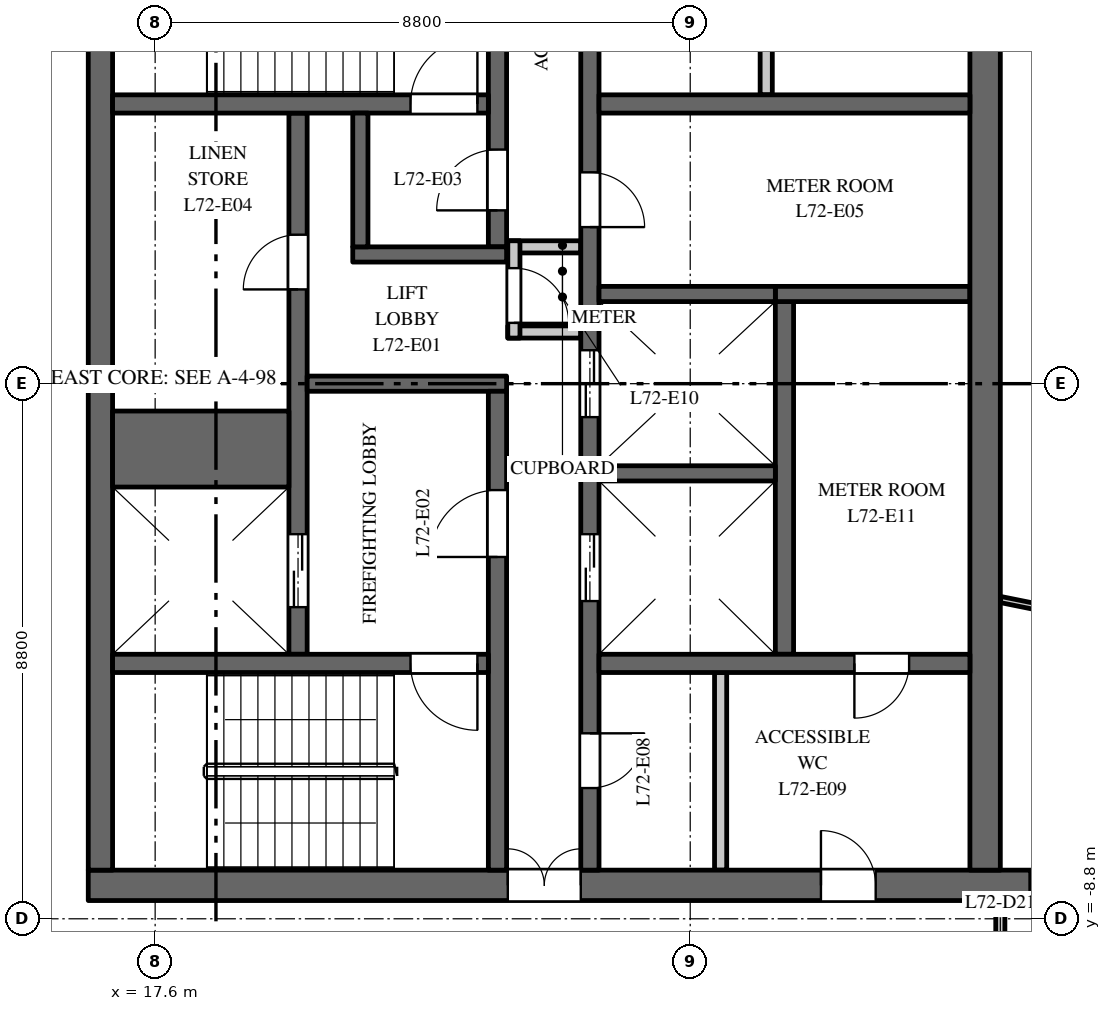
"""IFC4 building model, lengths in metres.
Left out: names, types, materials, properties, quantities, classifications, styles, units other than length and angle.
Written with IfcOpenShell. Run it as: python <this file> out.ifc"""

import sys

from ifc_helpers import new_model, si_unit, direction, frame, frame_2d, origin, place, context, subcontext, project, spatial, rectangle, extrude, element, fill, save


model = new_model("IFC4")
c1 = context("Model", 3, precision=1e-05, world=origin(), true_north=direction((0.0, 1.0)))
c2 = subcontext(c1, "Body", "Model", "MODEL_VIEW")
j1 = project(units=[si_unit("LENGTHUNIT", "METRE"), si_unit("PLANEANGLEUNIT", "RADIAN")], contexts=[c1])
p1 = place(None, origin())
s1 = spatial("IfcSite", under=j1, at=p1, CompositionType="ELEMENT")
p2 = place(p1, origin())
s2 = spatial("IfcBuilding", under=s1, at=p2, CompositionType="ELEMENT")
p3 = place(p2, frame((0.0, 0.0, 331.0)))
s3 = spatial("IfcBuildingStorey", under=s2, at=p3, CompositionType="ELEMENT", Elevation=331.0)
p4 = place(p3, frame((16.5, -8.25, 0.0), z_axis=(0.0, 0.0, 1.0), x_axis=(1.0, 0.0, 0.0)))
e1 = element("IfcWall", 1, at=p4, inside=s3, PredefinedType="SHEAR", context=c2, shape_type="SweptSolid", body=[
    extrude(rectangle(XDim=15.5, YDim=0.5, at=frame_2d((7.75, 0.0))), origin(), (0.0, 0.0, 1.0), 3.7),
])
p5 = place(p4, frame((6.9, 0.0, 0.0)))
e2 = element("IfcOpeningElement", 2, at=p5, cuts=e1, PredefinedType="OPENING", context=c2, shape_type="SweptSolid", body=[
    extrude(rectangle(XDim=1.2, YDim=2.1, at=frame_2d((0.6, 1.05))), frame((0.0, 0.26, 0.0), z_axis=(0.0, -1.0, 0.0), x_axis=(1.0, 0.0, 0.0)), (0.0, 0.0, 1.0), 0.52),
])
p6 = place(p4, frame((12.05, 0.0, 0.0)))
e3 = element("IfcOpeningElement", 3, at=p6, cuts=e1, PredefinedType="OPENING", context=c2, shape_type="SweptSolid", body=[
    extrude(rectangle(XDim=0.9, YDim=2.1, at=frame_2d((0.45, 1.05))), frame((0.0, 0.26, 0.0), z_axis=(0.0, -1.0, 0.0), x_axis=(1.0, 0.0, 0.0)), (0.0, 0.0, 1.0), 0.52),
])
p7 = place(p3, frame((27.95, -4.45, 0.0), z_axis=(0.0, 0.0, 1.0), x_axis=(0.0, 1.0, 0.0)))
e4 = element("IfcWall", 4, at=p7, inside=s3, PredefinedType="SHEAR", context=c2, shape_type="SweptSolid", body=[
    extrude(rectangle(XDim=5.8, YDim=0.3, at=frame_2d((2.9, 0.0))), origin(), (0.0, 0.0, 1.0), 3.7),
])
p8 = place(p3, frame((27.8, 1.475, 0.0), z_axis=(0.0, 0.0, 1.0), x_axis=(1.0, 0.0, 0.0)))
e5 = element("IfcWall", 5, at=p8, inside=s3, PredefinedType="SHEAR", context=c2, shape_type="SweptSolid", body=[
    extrude(rectangle(XDim=3.2, YDim=0.25, at=frame_2d((1.6, 0.0))), origin(), (0.0, 0.0, 1.0), 3.7),
])
p9 = place(p3, frame((19.95, -4.45, 0.0), z_axis=(0.0, 0.0, 1.0), x_axis=(0.0, 1.0, 0.0)))
e6 = element("IfcWall", 6, at=p9, inside=s3, PredefinedType="SHEAR", context=c2, shape_type="SweptSolid", body=[
    extrude(rectangle(XDim=8.9, YDim=0.3, at=frame_2d((4.45, 0.0))), origin(), (0.0, 0.0, 1.0), 3.7),
])
p10 = place(p9, frame((0.775, 0.0, 0.0)))
e7 = element("IfcOpeningElement", 7, at=p10, cuts=e6, PredefinedType="OPENING", context=c2, shape_type="SweptSolid", body=[
    extrude(rectangle(XDim=1.2, YDim=2.1, at=frame_2d((0.6, 1.05))), frame((0.0, 0.16, 0.0), z_axis=(0.0, -1.0, 0.0), x_axis=(1.0, 0.0, 0.0)), (0.0, 0.0, 1.0), 0.32),
])
p11 = place(p9, frame((6.0, 0.0, 0.0)))
e8 = element("IfcOpeningElement", 8, at=p11, cuts=e6, PredefinedType="OPENING", context=c2, shape_type="SweptSolid", body=[
    extrude(rectangle(XDim=0.9, YDim=2.1, at=frame_2d((0.45, 1.05))), frame((0.0, 0.16, 0.0), z_axis=(0.0, -1.0, 0.0), x_axis=(1.0, 0.0, 0.0)), (0.0, 0.0, 1.0), 0.32),
])
p12 = place(p3, frame((24.75, -8.0, 0.0), z_axis=(0.0, 0.0, 1.0), x_axis=(0.0, 1.0, 0.0)))
e9 = element("IfcWall", 9, at=p12, inside=s3, PredefinedType="SHEAR", context=c2, shape_type="SweptSolid", body=[
    extrude(rectangle(XDim=16.0, YDim=0.3, at=frame_2d((8.0, 0.0))), origin(), (0.0, 0.0, 1.0), 3.7),
])
p13 = place(p12, frame((4.425, 0.0, 0.0)))
e10 = element("IfcOpeningElement", 10, at=p13, cuts=e9, PredefinedType="OPENING", context=c2, shape_type="SweptSolid", body=[
    extrude(rectangle(XDim=1.1, YDim=2.1, at=frame_2d((0.55, 1.05))), frame((0.0, 0.16, 0.0), z_axis=(0.0, -1.0, 0.0), x_axis=(1.0, 0.0, 0.0)), (0.0, 0.0, 1.0), 0.32),
])
p14 = place(p12, frame((7.45, 0.0, 0.0)))
e11 = element("IfcOpeningElement", 11, at=p14, cuts=e9, PredefinedType="OPENING", context=c2, shape_type="SweptSolid", body=[
    extrude(rectangle(XDim=1.1, YDim=2.1, at=frame_2d((0.55, 1.05))), frame((0.0, 0.16, 0.0), z_axis=(0.0, -1.0, 0.0), x_axis=(1.0, 0.0, 0.0)), (0.0, 0.0, 1.0), 0.32),
])
p15 = place(p12, frame((10.575, 0.0, 0.0)))
e12 = element("IfcOpeningElement", 12, at=p15, cuts=e9, PredefinedType="OPENING", context=c2, shape_type="SweptSolid", body=[
    extrude(rectangle(XDim=0.9, YDim=2.1, at=frame_2d((0.45, 1.05))), frame((0.0, 0.16, 0.0), z_axis=(0.0, -1.0, 0.0), x_axis=(1.0, 0.0, 0.0)), (0.0, 0.0, 1.0), 0.32),
])
p16 = place(p12, frame((13.75, 0.0, 0.0)))
e13 = element("IfcOpeningElement", 13, at=p16, cuts=e9, PredefinedType="OPENING", context=c2, shape_type="SweptSolid", body=[
    extrude(rectangle(XDim=0.9, YDim=2.1, at=frame_2d((0.45, 1.05))), frame((0.0, 0.16, 0.0), z_axis=(0.0, -1.0, 0.0), x_axis=(1.0, 0.0, 0.0)), (0.0, 0.0, 1.0), 0.32),
])
p17 = place(p12, frame((1.35, 0.0, 0.0)))
e14 = element("IfcOpeningElement", 14, at=p17, cuts=e9, PredefinedType="OPENING", context=c2, shape_type="SweptSolid", body=[
    extrude(rectangle(XDim=0.9, YDim=2.1, at=frame_2d((0.45, 1.05))), frame((0.0, 0.16, 0.0), z_axis=(0.0, -1.0, 0.0), x_axis=(1.0, 0.0, 0.0)), (0.0, 0.0, 1.0), 0.32),
])
p18 = place(p3, frame((20.1, 0.0, 0.0), z_axis=(0.0, 0.0, 1.0), x_axis=(1.0, 0.0, 0.0)))
e15 = element("IfcWall", 15, at=p18, inside=s3, PredefinedType="SHEAR", context=c2, shape_type="SweptSolid", body=[
    extrude(rectangle(XDim=3.28, YDim=0.25, at=frame_2d((1.64, 0.0))), origin(), (0.0, 0.0, 1.0), 3.7),
])
p19 = place(p3, frame((16.7, -8.0, 0.0), z_axis=(0.0, 0.0, 1.0), x_axis=(0.0, 1.0, 0.0)))
e16 = element("IfcWall", 16, at=p19, inside=s3, PredefinedType="SHEAR", context=c2, shape_type="SweptSolid", body=[
    extrude(rectangle(XDim=16.0, YDim=0.4, at=frame_2d((8.0, 0.0))), origin(), (0.0, 0.0, 1.0), 3.7),
])
for number, where, z_axis, x_axis in (
    (17, (23.4, 0.85, 0.0), (0.0, 0.0, 1.0), (1.0, 0.0, 0.0)),
    (18, (23.4, 2.25, 0.0), (0.0, 0.0, 1.0), (1.0, 0.0, 0.0)),
):
    element("IfcWall", number, at=place(p3, frame(where, z_axis=z_axis, x_axis=x_axis)), inside=s3, PredefinedType="PARTITIONING", context=c2, shape_type="SweptSolid", body=[
        extrude(rectangle(XDim=1.2, YDim=0.2, at=frame_2d((0.6, 0.0))), origin(), (0.0, 0.0, 1.0), 3.7),
    ])
p20 = place(p3, frame((23.5, 0.75, 0.0), z_axis=(0.0, 0.0, 1.0), x_axis=(0.0, 1.0, 0.0)))
e19 = element("IfcWall", 19, at=p20, inside=s3, PredefinedType="PARTITIONING", context=c2, shape_type="SweptSolid", body=[
    extrude(rectangle(XDim=1.6, YDim=0.2, at=frame_2d((0.8, 0.0))), origin(), (0.0, 0.0, 1.0), 3.7),
])
p21 = place(p20, frame((0.25, 0.0, 0.0)))
e20 = element("IfcOpeningElement", 20, at=p21, cuts=e19, PredefinedType="OPENING", context=c2, shape_type="SweptSolid", body=[
    extrude(rectangle(XDim=0.9, YDim=2.1, at=frame_2d((0.45, 1.05))), frame((0.0, 0.11, 0.0), z_axis=(0.0, -1.0, 0.0), x_axis=(1.0, 0.0, 0.0)), (0.0, 0.0, 1.0), 0.22),
])
p22 = place(p3, frame((31.25, -8.0, 0.0), z_axis=(0.0, 0.0, 1.0), x_axis=(0.0, 1.0, 0.0)))
e21 = element("IfcWall", 21, at=p22, inside=s3, PredefinedType="SHEAR", context=c2, shape_type="SweptSolid", body=[
    extrude(rectangle(XDim=16.0, YDim=0.5, at=frame_2d((8.0, 0.0))), origin(), (0.0, 0.0, 1.0), 3.7),
])
p23 = place(p3, frame((24.9, 4.6, 0.0), z_axis=(0.0, 0.0, 1.0), x_axis=(1.0, 0.0, 0.0)))
e22 = element("IfcWall", 22, at=p23, inside=s3, PredefinedType="SHEAR", context=c2, shape_type="SweptSolid", body=[
    extrude(rectangle(XDim=6.1, YDim=0.3, at=frame_2d((3.05, 0.0))), origin(), (0.0, 0.0, 1.0), 3.7),
])
for number, where, z_axis, x_axis in (
    (23, (27.65, 4.75, 0.0), (0.0, 0.0, 1.0), (0.0, 1.0, 0.0)),
    (24, (26.9, -8.0, 0.0), (0.0, 0.0, 1.0), (0.0, 1.0, 0.0)),
):
    element("IfcWall", number, at=place(p3, frame(where, z_axis=z_axis, x_axis=x_axis)), inside=s3, PredefinedType="PARTITIONING", context=c2, shape_type="SweptSolid", body=[
        extrude(rectangle(XDim=3.25, YDim=0.2, at=frame_2d((1.625, 0.0))), origin(), (0.0, 0.0, 1.0), 3.7),
    ])
p24 = place(p3, frame((24.9, -4.6, 0.0), z_axis=(0.0, 0.0, 1.0), x_axis=(1.0, 0.0, 0.0)))
e25 = element("IfcWall", 25, at=p24, inside=s3, PredefinedType="SHEAR", context=c2, shape_type="SweptSolid", body=[
    extrude(rectangle(XDim=6.1, YDim=0.3, at=frame_2d((3.05, 0.0))), origin(), (0.0, 0.0, 1.0), 3.7),
])
p25 = place(p24, frame((4.2, 0.0, 0.0)))
e26 = element("IfcOpeningElement", 26, at=p25, cuts=e25, PredefinedType="OPENING", context=c2, shape_type="SweptSolid", body=[
    extrude(rectangle(XDim=0.9, YDim=2.1, at=frame_2d((0.45, 1.05))), frame((0.0, 0.16, 0.0), z_axis=(0.0, -1.0, 0.0), x_axis=(1.0, 0.0, 0.0)), (0.0, 0.0, 1.0), 0.32),
])
p26 = place(p3, frame((16.9, -1.075, 0.0), z_axis=(0.0, 0.0, 1.0), x_axis=(1.0, 0.0, 0.0)))
e27 = element("IfcWall", 27, at=p26, inside=s3, PredefinedType="SHEAR", context=c2, shape_type="SweptSolid", body=[
    extrude(rectangle(XDim=2.9, YDim=1.25, at=frame_2d((1.45, 0.0))), origin(), (0.0, 0.0, 1.0), 3.7),
])
for number, where, z_axis, x_axis in (
    (28, (24.9, -1.475, 0.0), (0.0, 0.0, 1.0), (1.0, 0.0, 0.0)),
    (29, (24.9, 1.475, 0.0), (0.0, 0.0, 1.0), (1.0, 0.0, 0.0)),
):
    element("IfcWall", number, at=place(p3, frame(where, z_axis=z_axis, x_axis=x_axis)), inside=s3, PredefinedType="SHEAR", context=c2, shape_type="SweptSolid", body=[
        extrude(rectangle(XDim=2.9, YDim=0.25, at=frame_2d((1.45, 0.0))), origin(), (0.0, 0.0, 1.0), 3.7),
    ])
p27 = place(p3, frame((23.23, 2.25, 0.0), z_axis=(0.0, 0.0, 1.0), x_axis=(0.0, 1.0, 0.0)))
e30 = element("IfcWall", 30, at=p27, inside=s3, PredefinedType="SHEAR", context=c2, shape_type="SweptSolid", body=[
    extrude(rectangle(XDim=5.75, YDim=0.3, at=frame_2d((2.875, 0.0))), origin(), (0.0, 0.0, 1.0), 3.7),
])
p28 = place(p27, frame((0.6, 0.0, 0.0)))
e31 = element("IfcOpeningElement", 31, at=p28, cuts=e30, PredefinedType="OPENING", context=c2, shape_type="SweptSolid", body=[
    extrude(rectangle(XDim=1.0, YDim=2.1, at=frame_2d((0.5, 1.05))), frame((0.0, 0.16, 0.0), z_axis=(0.0, -1.0, 0.0), x_axis=(1.0, 0.0, 0.0)), (0.0, 0.0, 1.0), 0.32),
])
p29 = place(p3, frame((23.23, -8.0, 0.0), z_axis=(0.0, 0.0, 1.0), x_axis=(0.0, 1.0, 0.0)))
e32 = element("IfcWall", 32, at=p29, inside=s3, PredefinedType="SHEAR", context=c2, shape_type="SweptSolid", body=[
    extrude(rectangle(XDim=7.875, YDim=0.3, at=frame_2d((3.938, 0.0))), origin(), (0.0, 0.0, 1.0), 3.7),
])
p30 = place(p29, frame((5.15, 0.0, 0.0)))
e33 = element("IfcOpeningElement", 33, at=p30, cuts=e32, PredefinedType="OPENING", context=c2, shape_type="SweptSolid", body=[
    extrude(rectangle(XDim=1.1, YDim=2.1, at=frame_2d((0.55, 1.05))), frame((0.0, 0.16, 0.0), z_axis=(0.0, -1.0, 0.0), x_axis=(1.0, 0.0, 0.0)), (0.0, 0.0, 1.0), 0.32),
])
p31 = place(p3, frame((16.9, 4.6, 0.0), z_axis=(0.0, 0.0, 1.0), x_axis=(1.0, 0.0, 0.0)))
e34 = element("IfcWall", 34, at=p31, inside=s3, PredefinedType="SHEAR", context=c2, shape_type="SweptSolid", body=[
    extrude(rectangle(XDim=6.18, YDim=0.3, at=frame_2d((3.09, 0.0))), origin(), (0.0, 0.0, 1.0), 3.7),
])
p32 = place(p31, frame((4.9, 0.0, 0.0)))
e35 = element("IfcOpeningElement", 35, at=p32, cuts=e34, PredefinedType="OPENING", context=c2, shape_type="SweptSolid", body=[
    extrude(rectangle(XDim=1.1, YDim=2.1, at=frame_2d((0.55, 1.05))), frame((0.0, 0.16, 0.0), z_axis=(0.0, -1.0, 0.0), x_axis=(1.0, 0.0, 0.0)), (0.0, 0.0, 1.0), 0.32),
])
p33 = place(p3, frame((16.9, -4.6, 0.0), z_axis=(0.0, 0.0, 1.0), x_axis=(1.0, 0.0, 0.0)))
e36 = element("IfcWall", 36, at=p33, inside=s3, PredefinedType="SHEAR", context=c2, shape_type="SweptSolid", body=[
    extrude(rectangle(XDim=6.18, YDim=0.3, at=frame_2d((3.09, 0.0))), origin(), (0.0, 0.0, 1.0), 3.7),
])
p34 = place(p33, frame((4.9, 0.0, 0.0)))
e37 = element("IfcOpeningElement", 37, at=p34, cuts=e36, PredefinedType="OPENING", context=c2, shape_type="SweptSolid", body=[
    extrude(rectangle(XDim=1.1, YDim=2.1, at=frame_2d((0.55, 1.05))), frame((0.0, 0.16, 0.0), z_axis=(0.0, -1.0, 0.0), x_axis=(1.0, 0.0, 0.0)), (0.0, 0.0, 1.0), 0.32),
])
p35 = place(p3, frame((20.85, 2.125, 0.0), z_axis=(0.0, 0.0, 1.0), x_axis=(1.0, 0.0, 0.0)))
e38 = element("IfcWall", 38, at=p35, inside=s3, PredefinedType="SHEAR", context=c2, shape_type="SweptSolid", body=[
    extrude(rectangle(XDim=2.53, YDim=0.25, at=frame_2d((1.265, 0.0))), origin(), (0.0, 0.0, 1.0), 3.7),
])
p36 = place(p3, frame((20.975, 2.25, 0.0), z_axis=(0.0, 0.0, 1.0), x_axis=(0.0, 1.0, 0.0)))
e39 = element("IfcWall", 39, at=p36, inside=s3, PredefinedType="SHEAR", context=c2, shape_type="SweptSolid", body=[
    extrude(rectangle(XDim=2.2, YDim=0.25, at=frame_2d((1.1, 0.0))), origin(), (0.0, 0.0, 1.0), 3.7),
])
p37 = place(p3, frame((31.5, -10.7, 0.0), z_axis=(0.0, 0.0, 1.0), x_axis=(0.0, 1.0, 0.0)))
e40 = element("IfcWall", 40, at=p37, inside=s3, PredefinedType="PARTITIONING", context=c2, shape_type="SweptSolid", body=[
    extrude(rectangle(XDim=2.2, YDim=0.15, at=frame_2d((1.1, 0.0))), origin(), (0.0, 0.0, 1.0), 3.0),
])
p38 = place(p37, frame((0.65, 0.0, 0.0)))
e41 = element("IfcOpeningElement", 41, at=p38, cuts=e40, PredefinedType="OPENING", context=c2, shape_type="SweptSolid", body=[
    extrude(rectangle(XDim=1.0, YDim=2.1, at=frame_2d((0.5, 1.05))), frame((0.0, 0.085, 0.0), z_axis=(0.0, -1.0, 0.0), x_axis=(1.0, 0.0, 0.0)), (0.0, 0.0, 1.0), 0.17),
])
p39 = place(p3, frame((31.5, -3.549, 0.0), z_axis=(0.0, 0.0, 1.0), x_axis=(0.980270539234, -0.197660491524, 0.0)))
e42 = element("IfcWall", 42, at=p39, inside=s3, PredefinedType="PARTITIONING", context=c2, shape_type="SweptSolid", body=[
    extrude(rectangle(XDim=3.891, YDim=0.1, at=frame_2d((1.945, 0.0))), origin(), (0.0, 0.0, 1.0), 3.0),
])
p40 = place(p10, origin())
e43 = element("IfcDoor", 43, at=p40, inside=s3, OperationType="DOUBLE_DOOR_SLIDING", PredefinedType="DOOR", context=c2, shape_type="SweptSolid", body=[
    extrude(rectangle(XDim=1.2, YDim=2.1, at=frame_2d((0.6, 1.05))), frame((0.0, 0.025, 0.0), z_axis=(0.0, -1.0, 0.0), x_axis=(1.0, 0.0, 0.0)), (0.0, 0.0, 1.0), 0.05),
])
fill(e7, e43)
p41 = place(p13, origin())
e44 = element("IfcDoor", 44, at=p41, inside=s3, OperationType="DOUBLE_DOOR_SLIDING", PredefinedType="DOOR", context=c2, shape_type="SweptSolid", body=[
    extrude(rectangle(XDim=1.1, YDim=2.1, at=frame_2d((0.55, 1.05))), frame((0.0, 0.025, 0.0), z_axis=(0.0, -1.0, 0.0), x_axis=(1.0, 0.0, 0.0)), (0.0, 0.0, 1.0), 0.05),
])
fill(e10, e44)
p42 = place(p14, origin())
e45 = element("IfcDoor", 45, at=p42, inside=s3, OperationType="DOUBLE_DOOR_SLIDING", PredefinedType="DOOR", context=c2, shape_type="SweptSolid", body=[
    extrude(rectangle(XDim=1.1, YDim=2.1, at=frame_2d((0.55, 1.05))), frame((0.0, 0.025, 0.0), z_axis=(0.0, -1.0, 0.0), x_axis=(1.0, 0.0, 0.0)), (0.0, 0.0, 1.0), 0.05),
])
fill(e11, e45)
p43 = place(p32, origin())
e46 = element("IfcDoor", 46, at=p43, inside=s3, OperationType="SINGLE_SWING_LEFT", PredefinedType="DOOR", context=c2, shape_type="SweptSolid", body=[
    extrude(rectangle(XDim=1.1, YDim=2.1, at=frame_2d((0.55, 1.05))), frame((0.0, 0.025, 0.0), z_axis=(0.0, -1.0, 0.0), x_axis=(1.0, 0.0, 0.0)), (0.0, 0.0, 1.0), 0.05),
])
fill(e35, e46)
p44 = place(p34, origin())
e47 = element("IfcDoor", 47, at=p44, inside=s3, OperationType="SINGLE_SWING_RIGHT", PredefinedType="DOOR", context=c2, shape_type="SweptSolid", body=[
    extrude(rectangle(XDim=1.1, YDim=2.1, at=frame_2d((0.55, 1.05))), frame((0.0, 0.025, 0.0), z_axis=(0.0, -1.0, 0.0), x_axis=(1.0, 0.0, 0.0)), (0.0, 0.0, 1.0), 0.05),
])
fill(e37, e47)
p45 = place(p30, origin())
e48 = element("IfcDoor", 48, at=p45, inside=s3, OperationType="SINGLE_SWING_RIGHT", PredefinedType="DOOR", context=c2, shape_type="SweptSolid", body=[
    extrude(rectangle(XDim=1.1, YDim=2.1, at=frame_2d((0.55, 1.05))), frame((0.0, 0.025, 0.0), z_axis=(0.0, -1.0, 0.0), x_axis=(1.0, 0.0, 0.0)), (0.0, 0.0, 1.0), 0.05),
])
fill(e33, e48)
p46 = place(p28, origin())
e49 = element("IfcDoor", 49, at=p46, inside=s3, OperationType="SINGLE_SWING_RIGHT", PredefinedType="DOOR", context=c2, shape_type="SweptSolid", body=[
    extrude(rectangle(XDim=1.0, YDim=2.1, at=frame_2d((0.5, 1.05))), frame((0.0, 0.025, 0.0), z_axis=(0.0, -1.0, 0.0), x_axis=(1.0, 0.0, 0.0)), (0.0, 0.0, 1.0), 0.05),
])
fill(e31, e49)
p47 = place(p5, origin())
e50 = element("IfcDoor", 50, at=p47, inside=s3, OperationType="DOUBLE_DOOR_DOUBLE_SWING", PredefinedType="DOOR", context=c2, shape_type="SweptSolid", body=[
    extrude(rectangle(XDim=1.2, YDim=2.1, at=frame_2d((0.6, 1.05))), frame((0.0, 0.025, 0.0), z_axis=(0.0, -1.0, 0.0), x_axis=(1.0, 0.0, 0.0)), (0.0, 0.0, 1.0), 0.05),
])
fill(e2, e50)
p48 = place(p11, origin())
e51 = element("IfcDoor", 51, at=p48, inside=s3, OperationType="SINGLE_SWING_RIGHT", PredefinedType="DOOR", context=c2, shape_type="SweptSolid", body=[
    extrude(rectangle(XDim=0.9, YDim=2.1, at=frame_2d((0.45, 1.05))), frame((0.0, 0.025, 0.0), z_axis=(0.0, -1.0, 0.0), x_axis=(1.0, 0.0, 0.0)), (0.0, 0.0, 1.0), 0.05),
])
fill(e8, e51)
p49 = place(p15, origin())
e52 = element("IfcDoor", 52, at=p49, inside=s3, OperationType="SINGLE_SWING_LEFT", PredefinedType="DOOR", context=c2, shape_type="SweptSolid", body=[
    extrude(rectangle(XDim=0.9, YDim=2.1, at=frame_2d((0.45, 1.05))), frame((0.0, 0.025, 0.0), z_axis=(0.0, -1.0, 0.0), x_axis=(1.0, 0.0, 0.0)), (0.0, 0.0, 1.0), 0.05),
])
fill(e12, e52)
p50 = place(p17, origin())
e53 = element("IfcDoor", 53, at=p50, inside=s3, OperationType="SINGLE_SWING_RIGHT", PredefinedType="DOOR", context=c2, shape_type="SweptSolid", body=[
    extrude(rectangle(XDim=0.9, YDim=2.1, at=frame_2d((0.45, 1.05))), frame((0.0, 0.025, 0.0), z_axis=(0.0, -1.0, 0.0), x_axis=(1.0, 0.0, 0.0)), (0.0, 0.0, 1.0), 0.05),
])
fill(e14, e53)
p51 = place(p6, origin())
e54 = element("IfcDoor", 54, at=p51, inside=s3, OperationType="SINGLE_SWING_RIGHT", PredefinedType="DOOR", context=c2, shape_type="SweptSolid", body=[
    extrude(rectangle(XDim=0.9, YDim=2.1, at=frame_2d((0.45, 1.05))), frame((0.0, 0.025, 0.0), z_axis=(0.0, -1.0, 0.0), x_axis=(1.0, 0.0, 0.0)), (0.0, 0.0, 1.0), 0.05),
])
fill(e3, e54)
p52 = place(p21, origin())
e55 = element("IfcDoor", 55, at=p52, inside=s3, OperationType="SINGLE_SWING_LEFT", PredefinedType="DOOR", context=c2, shape_type="SweptSolid", body=[
    extrude(rectangle(XDim=0.9, YDim=2.1, at=frame_2d((0.45, 1.05))), frame((0.0, 0.025, 0.0), z_axis=(0.0, -1.0, 0.0), x_axis=(1.0, 0.0, 0.0)), (0.0, 0.0, 1.0), 0.05),
])
fill(e20, e55)
p53 = place(p25, origin())
e56 = element("IfcDoor", 56, at=p53, inside=s3, OperationType="SINGLE_SWING_LEFT", PredefinedType="DOOR", context=c2, shape_type="SweptSolid", body=[
    extrude(rectangle(XDim=0.9, YDim=2.1, at=frame_2d((0.45, 1.05))), frame((0.0, 0.025, 0.0), z_axis=(0.0, -1.0, 0.0), x_axis=(1.0, 0.0, 0.0)), (0.0, 0.0, 1.0), 0.05),
])
fill(e26, e56)
save(model, sys.argv[1])
